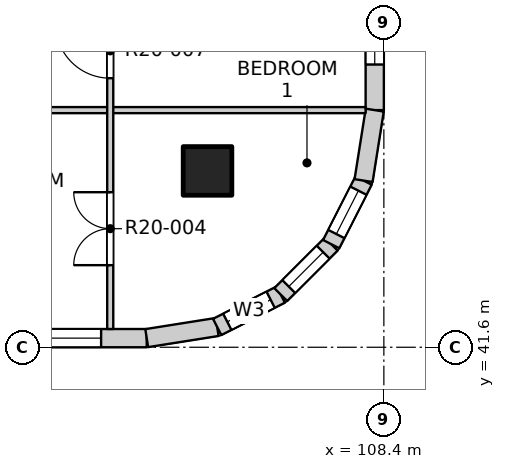
"""IFC4 building model, lengths in metres.
Left out: names, types, materials, properties, quantities, classifications, styles, units other than length and angle.
Written with IfcOpenShell. Run it as: python <this file> out.ifc"""

import sys

from ifc_helpers import new_model, si_unit, direction, frame, frame_2d, origin, origin_2d, place, context, subcontext, project, spatial, rectangle, extrude, element, fill, save


model = new_model("IFC4")
c1 = context("Model", 3, precision=1e-05, world=origin(), true_north=direction((0.0, 1.0)))
c2 = subcontext(c1, "Body", "Model", "MODEL_VIEW")
j1 = project(units=[si_unit("LENGTHUNIT", "METRE"), si_unit("PLANEANGLEUNIT", "RADIAN")], contexts=[c1])
p1 = place(None, origin())
s1 = spatial("IfcSite", under=j1, at=p1, CompositionType="ELEMENT")
p2 = place(p1, origin())
s2 = spatial("IfcBuilding", under=s1, at=p2, CompositionType="ELEMENT")
p3 = place(p2, frame((0.0, 0.0, 204.1)))
s3 = spatial("IfcBuildingStorey", under=s2, at=p3, CompositionType="ELEMENT", Elevation=204.1)
p4 = place(p3, frame((105.5, 44.5, -0.25), z_axis=(0.0, 0.0, 1.0), x_axis=(1.0, 0.0, 0.0)))
e1 = element("IfcColumn", 1, at=p4, inside=s3, PredefinedType="COLUMN", context=c2, shape_type="SweptSolid", body=[
    extrude(rectangle(XDim=0.8, YDim=0.8, at=origin_2d()), origin(), (0.0, 0.0, 1.0), 3.4),
])
p5 = place(p3, frame((97.1, 41.75, 0.0), z_axis=(0.0, 0.0, 1.0), x_axis=(1.0, 0.0, 0.0)))
e2 = element("IfcWall", 2, at=p5, inside=s3, PredefinedType="SOLIDWALL", context=c2, shape_type="SweptSolid", body=[
    extrude(rectangle(XDim=7.4, YDim=0.3, at=frame_2d((3.7, 0.0))), origin(), (0.0, 0.0, 1.0), 2.7),
])
p6 = place(p5, frame((0.35, 0.0, 0.9)))
e3 = element("IfcOpeningElement", 3, at=p6, cuts=e2, PredefinedType="OPENING", context=c2, shape_type="SweptSolid", body=[
    extrude(rectangle(XDim=2.4, YDim=1.8, at=frame_2d((1.2, 0.9))), frame((0.0, 0.16, 0.0), z_axis=(0.0, -1.0, 0.0), x_axis=(1.0, 0.0, 0.0)), (0.0, 0.0, 1.0), 0.32),
])
p7 = place(p5, frame((4.25, 0.0, 0.9)))
e4 = element("IfcOpeningElement", 4, at=p7, cuts=e2, PredefinedType="OPENING", context=c2, shape_type="SweptSolid", body=[
    extrude(rectangle(XDim=2.4, YDim=1.8, at=frame_2d((1.2, 0.9))), frame((0.0, 0.16, 0.0), z_axis=(0.0, -1.0, 0.0), x_axis=(1.0, 0.0, 0.0)), (0.0, 0.0, 1.0), 0.32),
])
p8 = place(p3, frame((108.25, 45.5, 0.0), z_axis=(0.0, 0.0, 1.0), x_axis=(0.0, 1.0, 0.0)))
e5 = element("IfcWall", 5, at=p8, inside=s3, PredefinedType="SOLIDWALL", context=c2, shape_type="SweptSolid", body=[
    extrude(rectangle(XDim=7.4, YDim=0.3, at=frame_2d((3.7, 0.0))), origin(), (0.0, 0.0, 1.0), 2.7),
])
p9 = place(p8, frame((0.75, 0.0, 0.9)))
e6 = element("IfcOpeningElement", 6, at=p9, cuts=e5, PredefinedType="OPENING", context=c2, shape_type="SweptSolid", body=[
    extrude(rectangle(XDim=2.4, YDim=1.8, at=frame_2d((1.2, 0.9))), frame((0.0, 0.16, 0.0), z_axis=(0.0, -1.0, 0.0), x_axis=(1.0, 0.0, 0.0)), (0.0, 0.0, 1.0), 0.32),
])
p10 = place(p8, frame((4.65, 0.0, 0.9)))
e7 = element("IfcOpeningElement", 7, at=p10, cuts=e5, PredefinedType="OPENING", context=c2, shape_type="SweptSolid", body=[
    extrude(rectangle(XDim=2.4, YDim=1.8, at=frame_2d((1.2, 0.9))), frame((0.0, 0.16, 0.0), z_axis=(0.0, -1.0, 0.0), x_axis=(1.0, 0.0, 0.0)), (0.0, 0.0, 1.0), 0.32),
])
p11 = place(p3, frame((104.5, 41.75, 0.0), z_axis=(0.0, 0.0, 1.0), x_axis=(0.987678452879, 0.156496880861, 0.0)))
e8 = element("IfcWall", 8, at=p11, inside=s3, PredefinedType="SOLIDWALL", context=c2, shape_type="SweptSolid", body=[
    extrude(rectangle(XDim=1.173, YDim=0.3, at=frame_2d((0.586, 0.0))), origin(), (0.0, 0.0, 1.0), 2.7),
])
p12 = place(p3, frame((105.659, 41.934, 0.0), z_axis=(0.0, 0.0, 1.0), x_axis=(0.890988677504, 0.454025524128, 0.0)))
e9 = element("IfcWall", 9, at=p12, inside=s3, PredefinedType="SOLIDWALL", context=c2, shape_type="SweptSolid", body=[
    extrude(rectangle(XDim=1.173, YDim=0.3, at=frame_2d((0.587, 0.0))), origin(), (0.0, 0.0, 1.0), 2.7),
])
p13 = place(p12, frame((0.187, 0.0, 0.9)))
e10 = element("IfcOpeningElement", 10, at=p13, cuts=e9, PredefinedType="OPENING", context=c2, shape_type="SweptSolid", body=[
    extrude(rectangle(XDim=0.8, YDim=1.2, at=frame_2d((0.4, 0.6))), frame((0.0, 0.16, 0.0), z_axis=(0.0, -1.0, 0.0), x_axis=(1.0, 0.0, 0.0)), (0.0, 0.0, 1.0), 0.32),
])
p14 = place(p3, frame((106.704, 42.466, 0.0), z_axis=(0.0, 0.0, 1.0), x_axis=(0.707106781187, 0.707106781187, 0.0)))
e11 = element("IfcWall", 11, at=p14, inside=s3, PredefinedType="SOLIDWALL", context=c2, shape_type="SweptSolid", body=[
    extrude(rectangle(XDim=1.173, YDim=0.3, at=frame_2d((0.586, 0.0))), origin(), (0.0, 0.0, 1.0), 2.7),
])
p15 = place(p14, frame((0.187, 0.0, 0.9)))
e12 = element("IfcOpeningElement", 12, at=p15, cuts=e11, PredefinedType="OPENING", context=c2, shape_type="SweptSolid", body=[
    extrude(rectangle(XDim=0.8, YDim=1.2, at=frame_2d((0.4, 0.6))), frame((0.0, 0.16, 0.0), z_axis=(0.0, -1.0, 0.0), x_axis=(1.0, 0.0, 0.0)), (0.0, 0.0, 1.0), 0.32),
])
p16 = place(p3, frame((107.534, 43.296, 0.0), z_axis=(0.0, 0.0, 1.0), x_axis=(0.454025524128, 0.890988677504, 0.0)))
e13 = element("IfcWall", 13, at=p16, inside=s3, PredefinedType="SOLIDWALL", context=c2, shape_type="SweptSolid", body=[
    extrude(rectangle(XDim=1.173, YDim=0.3, at=frame_2d((0.587, 0.0))), origin(), (0.0, 0.0, 1.0), 2.7),
])
p17 = place(p16, frame((0.187, 0.0, 0.9)))
e14 = element("IfcOpeningElement", 14, at=p17, cuts=e13, PredefinedType="OPENING", context=c2, shape_type="SweptSolid", body=[
    extrude(rectangle(XDim=0.8, YDim=1.2, at=frame_2d((0.4, 0.6))), frame((0.0, 0.16, 0.0), z_axis=(0.0, -1.0, 0.0), x_axis=(1.0, 0.0, 0.0)), (0.0, 0.0, 1.0), 0.32),
])
p18 = place(p3, frame((108.066, 44.341, 0.0), z_axis=(0.0, 0.0, 1.0), x_axis=(0.156496880861, 0.987678452879, 0.0)))
e15 = element("IfcWall", 15, at=p18, inside=s3, PredefinedType="SOLIDWALL", context=c2, shape_type="SweptSolid", body=[
    extrude(rectangle(XDim=1.173, YDim=0.3, at=frame_2d((0.586, 0.0))), origin(), (0.0, 0.0, 1.0), 2.7),
])
p19 = place(p3, frame((96.625, 45.5, 0.0), z_axis=(0.0, 0.0, 1.0), x_axis=(1.0, 0.0, 0.0)))
e16 = element("IfcWall", 16, at=p19, inside=s3, PredefinedType="PARTITIONING", context=c2, shape_type="SweptSolid", body=[
    extrude(rectangle(XDim=11.475, YDim=0.1, at=frame_2d((5.738, 0.0))), origin(), (0.0, 0.0, 1.0), 3.15),
])
p20 = place(p19, frame((2.61, 0.0, 0.0)))
e17 = element("IfcOpeningElement", 17, at=p20, cuts=e16, PredefinedType="OPENING", context=c2, shape_type="SweptSolid", body=[
    extrude(rectangle(XDim=0.9, YDim=2.1, at=frame_2d((0.45, 1.05))), frame((0.0, 0.06, 0.0), z_axis=(0.0, -1.0, 0.0), x_axis=(1.0, 0.0, 0.0)), (0.0, 0.0, 1.0), 0.12),
])
p21 = place(p3, frame((103.9, 41.9, 0.0), z_axis=(0.0, 0.0, 1.0), x_axis=(0.0, 1.0, 0.0)))
e18 = element("IfcWall", 18, at=p21, inside=s3, PredefinedType="PARTITIONING", context=c2, shape_type="SweptSolid", body=[
    extrude(rectangle(XDim=19.1, YDim=0.1, at=frame_2d((9.55, 0.0))), origin(), (0.0, 0.0, 1.0), 3.15),
])
p22 = place(p21, frame((1.05, 0.0, 0.0)))
e19 = element("IfcOpeningElement", 19, at=p22, cuts=e18, PredefinedType="OPENING", context=c2, shape_type="SweptSolid", body=[
    extrude(rectangle(XDim=1.2, YDim=2.1, at=frame_2d((0.6, 1.05))), frame((0.0, 0.06, 0.0), z_axis=(0.0, -1.0, 0.0), x_axis=(1.0, 0.0, 0.0)), (0.0, 0.0, 1.0), 0.12),
])
p23 = place(p21, frame((4.125, 0.0, 0.0)))
e20 = element("IfcOpeningElement", 20, at=p23, cuts=e18, PredefinedType="OPENING", context=c2, shape_type="SweptSolid", body=[
    extrude(rectangle(XDim=0.9, YDim=2.1, at=frame_2d((0.45, 1.05))), frame((0.0, 0.06, 0.0), z_axis=(0.0, -1.0, 0.0), x_axis=(1.0, 0.0, 0.0)), (0.0, 0.0, 1.0), 0.12),
])
p24 = place(p21, frame((6.075, 0.0, 0.0)))
e21 = element("IfcOpeningElement", 21, at=p24, cuts=e18, PredefinedType="OPENING", context=c2, shape_type="SweptSolid", body=[
    extrude(rectangle(XDim=0.9, YDim=2.1, at=frame_2d((0.45, 1.05))), frame((0.0, 0.06, 0.0), z_axis=(0.0, -1.0, 0.0), x_axis=(1.0, 0.0, 0.0)), (0.0, 0.0, 1.0), 0.12),
])
p25 = place(p21, frame((8.85, 0.0, 0.0)))
e22 = element("IfcOpeningElement", 22, at=p25, cuts=e18, PredefinedType="OPENING", context=c2, shape_type="SweptSolid", body=[
    extrude(rectangle(XDim=1.2, YDim=2.1, at=frame_2d((0.6, 1.05))), frame((0.0, 0.06, 0.0), z_axis=(0.0, -1.0, 0.0), x_axis=(1.0, 0.0, 0.0)), (0.0, 0.0, 1.0), 0.12),
])
p26 = place(p21, frame((11.925, 0.0, 0.0)))
e23 = element("IfcOpeningElement", 23, at=p26, cuts=e18, PredefinedType="OPENING", context=c2, shape_type="SweptSolid", body=[
    extrude(rectangle(XDim=0.9, YDim=2.1, at=frame_2d((0.45, 1.05))), frame((0.0, 0.06, 0.0), z_axis=(0.0, -1.0, 0.0), x_axis=(1.0, 0.0, 0.0)), (0.0, 0.0, 1.0), 0.12),
])
p27 = place(p21, frame((13.875, 0.0, 0.0)))
e24 = element("IfcOpeningElement", 24, at=p27, cuts=e18, PredefinedType="OPENING", context=c2, shape_type="SweptSolid", body=[
    extrude(rectangle(XDim=0.9, YDim=2.1, at=frame_2d((0.45, 1.05))), frame((0.0, 0.06, 0.0), z_axis=(0.0, -1.0, 0.0), x_axis=(1.0, 0.0, 0.0)), (0.0, 0.0, 1.0), 0.12),
])
p28 = place(p21, frame((15.825, 0.0, 0.0)))
e25 = element("IfcOpeningElement", 25, at=p28, cuts=e18, PredefinedType="OPENING", context=c2, shape_type="SweptSolid", body=[
    extrude(rectangle(XDim=0.9, YDim=2.1, at=frame_2d((0.45, 1.05))), frame((0.0, 0.06, 0.0), z_axis=(0.0, -1.0, 0.0), x_axis=(1.0, 0.0, 0.0)), (0.0, 0.0, 1.0), 0.12),
])
p29 = place(p21, frame((17.775, 0.0, 0.0)))
e26 = element("IfcOpeningElement", 26, at=p29, cuts=e18, PredefinedType="OPENING", context=c2, shape_type="SweptSolid", body=[
    extrude(rectangle(XDim=0.9, YDim=2.1, at=frame_2d((0.45, 1.05))), frame((0.0, 0.06, 0.0), z_axis=(0.0, -1.0, 0.0), x_axis=(1.0, 0.0, 0.0)), (0.0, 0.0, 1.0), 0.12),
])
p30 = place(p7, origin())
e27 = element("IfcWindow", 27, at=p30, inside=s3, PartitioningType="DOUBLE_PANEL_VERTICAL", PredefinedType="WINDOW", context=c2, shape_type="SweptSolid", body=[
    extrude(rectangle(XDim=2.4, YDim=1.8, at=frame_2d((1.2, 0.9))), frame((0.0, 0.03, 0.0), z_axis=(0.0, -1.0, 0.0), x_axis=(1.0, 0.0, 0.0)), (0.0, 0.0, 1.0), 0.06),
])
fill(e4, e27)
p31 = place(p9, origin())
e28 = element("IfcWindow", 28, at=p31, inside=s3, PartitioningType="DOUBLE_PANEL_VERTICAL", PredefinedType="WINDOW", context=c2, shape_type="SweptSolid", body=[
    extrude(rectangle(XDim=2.4, YDim=1.8, at=frame_2d((1.2, 0.9))), frame((0.0, 0.03, 0.0), z_axis=(0.0, -1.0, 0.0), x_axis=(1.0, 0.0, 0.0)), (0.0, 0.0, 1.0), 0.06),
])
fill(e6, e28)
p32 = place(p13, origin())
e29 = element("IfcWindow", 29, at=p32, inside=s3, PartitioningType="SINGLE_PANEL", PredefinedType="WINDOW", context=c2, shape_type="SweptSolid", body=[
    extrude(rectangle(XDim=0.8, YDim=1.2, at=frame_2d((0.4, 0.6))), frame((0.0, 0.03, 0.0), z_axis=(0.0, -1.0, 0.0), x_axis=(1.0, 0.0, 0.0)), (0.0, 0.0, 1.0), 0.06),
])
fill(e10, e29)
p33 = place(p15, origin())
e30 = element("IfcWindow", 30, at=p33, inside=s3, PartitioningType="SINGLE_PANEL", PredefinedType="WINDOW", context=c2, shape_type="SweptSolid", body=[
    extrude(rectangle(XDim=0.8, YDim=1.2, at=frame_2d((0.4, 0.6))), frame((0.0, 0.03, 0.0), z_axis=(0.0, -1.0, 0.0), x_axis=(1.0, 0.0, 0.0)), (0.0, 0.0, 1.0), 0.06),
])
fill(e12, e30)
p34 = place(p17, origin())
e31 = element("IfcWindow", 31, at=p34, inside=s3, PartitioningType="SINGLE_PANEL", PredefinedType="WINDOW", context=c2, shape_type="SweptSolid", body=[
    extrude(rectangle(XDim=0.8, YDim=1.2, at=frame_2d((0.4, 0.6))), frame((0.0, 0.03, 0.0), z_axis=(0.0, -1.0, 0.0), x_axis=(1.0, 0.0, 0.0)), (0.0, 0.0, 1.0), 0.06),
])
fill(e14, e31)
p35 = place(p22, origin())
e32 = element("IfcDoor", 32, at=p35, inside=s3, OperationType="DOUBLE_DOOR_SINGLE_SWING", PredefinedType="DOOR", context=c2, shape_type="SweptSolid", body=[
    extrude(rectangle(XDim=1.2, YDim=2.1, at=frame_2d((0.6, 1.05))), frame((0.0, 0.025, 0.0), z_axis=(0.0, -1.0, 0.0), x_axis=(1.0, 0.0, 0.0)), (0.0, 0.0, 1.0), 0.05),
])
fill(e19, e32)
p36 = place(p23, origin())
e33 = element("IfcDoor", 33, at=p36, inside=s3, OperationType="SINGLE_SWING_RIGHT", PredefinedType="DOOR", context=c2, shape_type="SweptSolid", body=[
    extrude(rectangle(XDim=0.9, YDim=2.1, at=frame_2d((0.45, 1.05))), frame((0.0, 0.025, 0.0), z_axis=(0.0, -1.0, 0.0), x_axis=(1.0, 0.0, 0.0)), (0.0, 0.0, 1.0), 0.05),
])
fill(e20, e33)
save(model, sys.argv[1])
